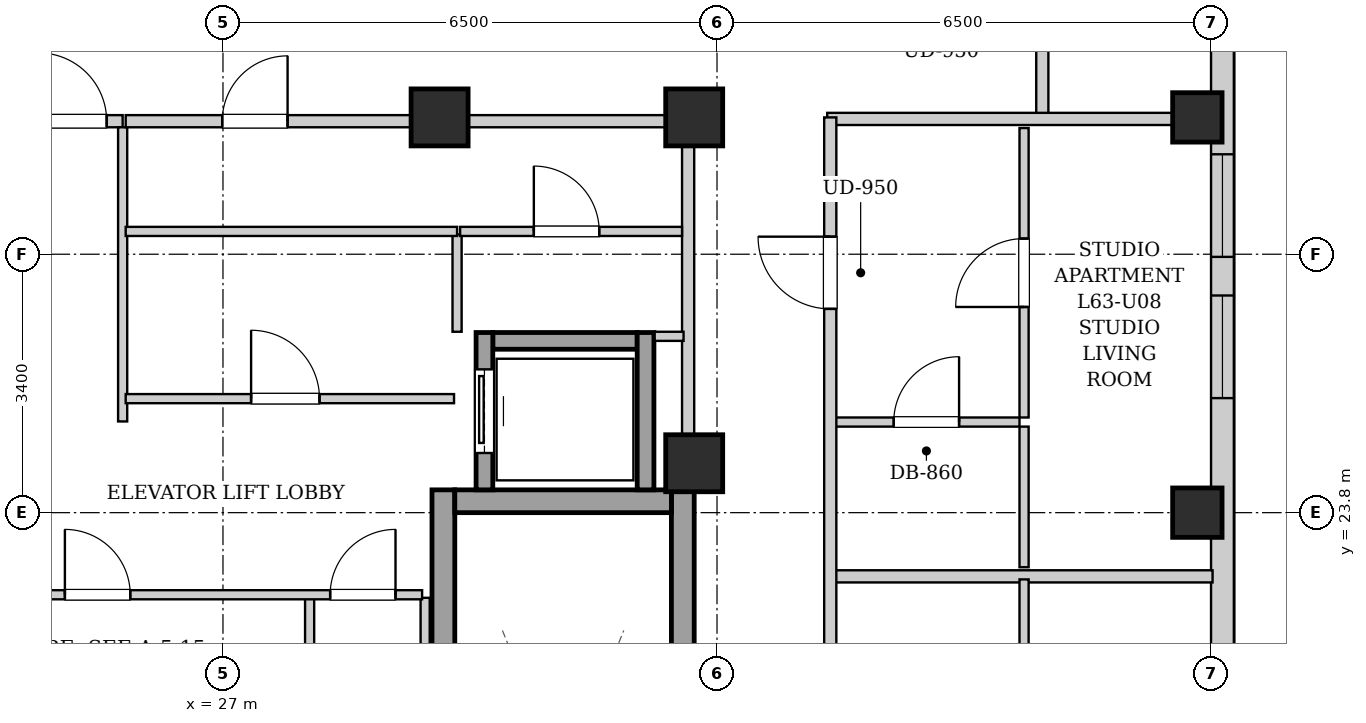
"""IFC4 building model, lengths in metres.
Left out: names, types, materials, properties, quantities, classifications, styles, units other than length and angle.
Written with IfcOpenShell. Run it as: python <this file> out.ifc"""

import sys

from ifc_helpers import new_model, si_unit, direction, frame, frame_2d, origin, origin_2d, place, context, subcontext, project, spatial, rectangle, extrude, element, fill, save


model = new_model("IFC4")
c1 = context("Model", 3, precision=1e-05, world=origin(), true_north=direction((0.0, 1.0)))
c2 = subcontext(c1, "Body", "Model", "MODEL_VIEW")
j1 = project(units=[si_unit("LENGTHUNIT", "METRE"), si_unit("PLANEANGLEUNIT", "RADIAN")], contexts=[c1])
p1 = place(None, origin())
s1 = spatial("IfcSite", under=j1, at=p1, CompositionType="ELEMENT")
p2 = place(p1, origin())
s2 = spatial("IfcBuilding", under=s1, at=p2, CompositionType="ELEMENT")
p3 = place(p2, frame((0.0, 0.0, 217.3)))
s3 = spatial("IfcBuildingStorey", under=s2, at=p3, CompositionType="ELEMENT", Elevation=217.3)
for number, where, z_axis, x_axis in (
    (1, (39.82, 23.8, 0.0), (0.0, 0.0, 1.0), (1.0, 0.0, 0.0)),
    (2, (39.82, 29.0, 0.0), (0.0, 0.0, 1.0), (1.0, 0.0, 0.0)),
):
    element("IfcColumn", number, at=place(p3, frame(where, z_axis=z_axis, x_axis=x_axis)), inside=s3, PredefinedType="COLUMN", context=c2, shape_type="SweptSolid", body=[
        extrude(rectangle(XDim=0.65, YDim=0.65, at=origin_2d()), origin(), (0.0, 0.0, 1.0), 3.4),
    ])
for number, where, z_axis, x_axis in (
    (3, (29.85, 29.0, 0.0), (0.0, 0.0, 1.0), (1.0, 0.0, 0.0)),
    (4, (33.2, 29.0, 0.0), (0.0, 0.0, 1.0), (1.0, 0.0, 0.0)),
    (5, (33.2, 24.45, 0.0), (0.0, 0.0, 1.0), (1.0, 0.0, 0.0)),
):
    element("IfcColumn", number, at=place(p3, frame(where, z_axis=z_axis, x_axis=x_axis)), inside=s3, PredefinedType="COLUMN", context=c2, shape_type="SweptSolid", body=[
        extrude(rectangle(XDim=0.75, YDim=0.75, at=origin_2d()), origin(), (0.0, 0.0, 1.0), 3.4),
    ])
p4 = place(p3, frame((40.15, 37.7, 0.0), z_axis=(0.0, 0.0, 1.0), x_axis=(0.0, -1.0, 0.0)))
e6 = element("IfcWall", 6, at=p4, inside=s3, PredefinedType="SOLIDWALL", context=c2, shape_type="SweptSolid", body=[
    extrude(rectangle(XDim=31.4, YDim=0.3, at=frame_2d((15.7, 0.0))), origin(), (0.0, 0.0, 1.0), 3.14),
])
p5 = place(p4, frame((28.546, 0.0, 0.55)))
e7 = element("IfcOpeningElement", 7, at=p5, cuts=e6, PredefinedType="OPENING", context=c2, shape_type="SweptSolid", body=[
    extrude(rectangle(XDim=1.35, YDim=1.2, at=frame_2d((0.675, 0.6))), frame((0.0, 0.16, 0.0), z_axis=(0.0, -1.0, 0.0), x_axis=(1.0, 0.0, 0.0)), (0.0, 0.0, 1.0), 0.32),
])
p6 = place(p4, frame((1.504, 0.0, 0.55)))
e8 = element("IfcOpeningElement", 8, at=p6, cuts=e6, PredefinedType="OPENING", context=c2, shape_type="SweptSolid", body=[
    extrude(rectangle(XDim=1.35, YDim=1.2, at=frame_2d((0.675, 0.6))), frame((0.0, 0.16, 0.0), z_axis=(0.0, -1.0, 0.0), x_axis=(1.0, 0.0, 0.0)), (0.0, 0.0, 1.0), 0.32),
])
p7 = place(p4, frame((18.2, 0.0, 0.55)))
e9 = element("IfcOpeningElement", 9, at=p7, cuts=e6, PredefinedType="OPENING", context=c2, shape_type="SweptSolid", body=[
    extrude(rectangle(XDim=1.35, YDim=1.2, at=frame_2d((0.675, 0.6))), frame((0.0, 0.16, 0.0), z_axis=(0.0, -1.0, 0.0), x_axis=(1.0, 0.0, 0.0)), (0.0, 0.0, 1.0), 0.32),
])
p8 = place(p4, frame((19.81, 0.0, 0.55)))
e10 = element("IfcOpeningElement", 10, at=p8, cuts=e6, PredefinedType="OPENING", context=c2, shape_type="SweptSolid", body=[
    extrude(rectangle(XDim=1.35, YDim=1.2, at=frame_2d((0.675, 0.6))), frame((0.0, 0.16, 0.0), z_axis=(0.0, -1.0, 0.0), x_axis=(1.0, 0.0, 0.0)), (0.0, 0.0, 1.0), 0.32),
])
p9 = place(p4, frame((11.043, 0.0, 0.55)))
e11 = element("IfcOpeningElement", 11, at=p9, cuts=e6, PredefinedType="OPENING", context=c2, shape_type="SweptSolid", body=[
    extrude(rectangle(XDim=1.35, YDim=1.2, at=frame_2d((0.675, 0.6))), frame((0.0, 0.16, 0.0), z_axis=(0.0, -1.0, 0.0), x_axis=(1.0, 0.0, 0.0)), (0.0, 0.0, 1.0), 0.32),
])
p10 = place(p4, frame((9.185, 0.0, 0.55)))
e12 = element("IfcOpeningElement", 12, at=p10, cuts=e6, PredefinedType="OPENING", context=c2, shape_type="SweptSolid", body=[
    extrude(rectangle(XDim=1.35, YDim=1.2, at=frame_2d((0.675, 0.6))), frame((0.0, 0.16, 0.0), z_axis=(0.0, -1.0, 0.0), x_axis=(1.0, 0.0, 0.0)), (0.0, 0.0, 1.0), 0.32),
])
for number, where, z_axis, x_axis in (
    (13, (29.9, 15.1, 0.0), (0.0, 0.0, 1.0), (0.0, 1.0, 0.0)),
    (14, (33.05, 15.1, 0.0), (0.0, 0.0, 1.0), (0.0, 1.0, 0.0)),
):
    element("IfcWall", number, at=place(p3, frame(where, z_axis=z_axis, x_axis=x_axis)), inside=s3, PredefinedType="SHEAR", context=c2, shape_type="SweptSolid", body=[
        extrude(rectangle(XDim=9.0, YDim=0.3, at=frame_2d((4.5, 0.0))), origin(), (0.0, 0.0, 1.0), 3.14),
    ])
p11 = place(p3, frame((30.05, 23.95, 0.0), z_axis=(0.0, 0.0, 1.0), x_axis=(1.0, 0.0, 0.0)))
e15 = element("IfcWall", 15, at=p11, inside=s3, PredefinedType="SHEAR", context=c2, shape_type="SweptSolid", body=[
    extrude(rectangle(XDim=2.85, YDim=0.3, at=frame_2d((1.425, 0.0))), origin(), (0.0, 0.0, 1.0), 3.14),
])
p12 = place(p3, frame((30.55, 26.06, 0.0), z_axis=(0.0, 0.0, 1.0), x_axis=(1.0, 0.0, 0.0)))
e16 = element("IfcWall", 16, at=p12, inside=s3, PredefinedType="SHEAR", context=c2, shape_type="SweptSolid", body=[
    extrude(rectangle(XDim=1.9, YDim=0.22, at=frame_2d((0.95, 0.0))), origin(), (0.0, 0.0, 1.0), 3.14),
])
p13 = place(p3, frame((30.44, 24.1, 0.0), z_axis=(0.0, 0.0, 1.0), x_axis=(0.0, 1.0, 0.0)))
e17 = element("IfcWall", 17, at=p13, inside=s3, PredefinedType="SHEAR", context=c2, shape_type="SweptSolid", body=[
    extrude(rectangle(XDim=2.07, YDim=0.22, at=frame_2d((1.035, 0.0))), origin(), (0.0, 0.0, 1.0), 3.14),
])
p14 = place(p13, frame((0.485, 0.0, 0.0)))
e18 = element("IfcOpeningElement", 18, at=p14, cuts=e17, PredefinedType="OPENING", context=c2, shape_type="SweptSolid", body=[
    extrude(rectangle(XDim=1.1, YDim=2.15, at=frame_2d((0.55, 1.075))), frame((0.0, 0.12, 0.0), z_axis=(0.0, -1.0, 0.0), x_axis=(1.0, 0.0, 0.0)), (0.0, 0.0, 1.0), 0.24),
])
p15 = place(p3, frame((32.56, 24.1, 0.0), z_axis=(0.0, 0.0, 1.0), x_axis=(0.0, 1.0, 0.0)))
e19 = element("IfcWall", 19, at=p15, inside=s3, PredefinedType="SHEAR", context=c2, shape_type="SweptSolid", body=[
    extrude(rectangle(XDim=2.07, YDim=0.22, at=frame_2d((1.035, 0.0))), origin(), (0.0, 0.0, 1.0), 3.14),
])
p16 = place(p3, frame((33.12, 24.12, 0.0), z_axis=(0.0, 0.0, 1.0), x_axis=(0.0, 1.0, 0.0)))
e20 = element("IfcWall", 20, at=p16, inside=s3, PredefinedType="PARTITIONING", context=c2, shape_type="SweptSolid", body=[
    extrude(rectangle(XDim=4.76, YDim=0.16, at=frame_2d((2.38, 0.0))), origin(), (0.0, 0.0, 1.0), 2.475),
])
p17 = place(p3, frame((24.36, 28.95, 0.0), z_axis=(0.0, 0.0, 1.0), x_axis=(1.0, 0.0, 0.0)))
e21 = element("IfcWall", 21, at=p17, inside=s3, PredefinedType="PARTITIONING", context=c2, shape_type="SweptSolid", body=[
    extrude(rectangle(XDim=1.32, YDim=0.16, at=frame_2d((0.66, 0.0))), origin(), (0.0, 0.0, 1.0), 2.668),
])
p18 = place(p17, frame((0.21, 0.0, 0.0)))
e22 = element("IfcOpeningElement", 22, at=p18, cuts=e21, PredefinedType="OPENING", context=c2, shape_type="SweptSolid", body=[
    extrude(rectangle(XDim=0.9, YDim=2.05, at=frame_2d((0.45, 1.025))), frame((0.0, 0.09, 0.0), z_axis=(0.0, -1.0, 0.0), x_axis=(1.0, 0.0, 0.0)), (0.0, 0.0, 1.0), 0.18),
])
p19 = place(p3, frame((25.68, 25.0, 0.0), z_axis=(0.0, 0.0, 1.0), x_axis=(0.0, 1.0, 0.0)))
e23 = element("IfcWall", 23, at=p19, inside=s3, PredefinedType="PARTITIONING", context=c2, shape_type="SweptSolid", body=[
    extrude(rectangle(XDim=3.87, YDim=0.12, at=frame_2d((1.935, 0.0))), origin(), (0.0, 0.0, 1.0), 3.14),
])
p20 = place(p3, frame((30.08, 26.18, 0.0), z_axis=(0.0, 0.0, 1.0), x_axis=(0.0, 1.0, 0.0)))
e24 = element("IfcWall", 24, at=p20, inside=s3, PredefinedType="PARTITIONING", context=c2, shape_type="SweptSolid", body=[
    extrude(rectangle(XDim=1.28, YDim=0.12, at=frame_2d((0.64, 0.0))), origin(), (0.0, 0.0, 1.0), 3.14),
])
p21 = place(p3, frame((32.68, 26.12, 0.0), z_axis=(0.0, 0.0, 1.0), x_axis=(1.0, 0.0, 0.0)))
e25 = element("IfcWall", 25, at=p21, inside=s3, PredefinedType="PARTITIONING", context=c2, shape_type="SweptSolid", body=[
    extrude(rectangle(XDim=0.38, YDim=0.12, at=frame_2d((0.19, 0.0))), origin(), (0.0, 0.0, 1.0), 3.14),
])
p22 = place(p3, frame((30.12, 27.5, 0.0), z_axis=(0.0, 0.0, 1.0), x_axis=(1.0, 0.0, 0.0)))
e26 = element("IfcWall", 26, at=p22, inside=s3, PredefinedType="PARTITIONING", context=c2, shape_type="SweptSolid", body=[
    extrude(rectangle(XDim=2.92, YDim=0.12, at=frame_2d((1.46, 0.0))), origin(), (0.0, 0.0, 1.0), 3.14),
])
p23 = place(p22, frame((0.97, 0.0, 0.0)))
e27 = element("IfcOpeningElement", 27, at=p23, cuts=e26, PredefinedType="OPENING", context=c2, shape_type="SweptSolid", body=[
    extrude(rectangle(XDim=0.86, YDim=2.05, at=frame_2d((0.43, 1.025))), frame((0.0, 0.07, 0.0), z_axis=(0.0, -1.0, 0.0), x_axis=(1.0, 0.0, 0.0)), (0.0, 0.0, 1.0), 0.14),
])
p24 = place(p3, frame((25.72, 27.5, 0.0), z_axis=(0.0, 0.0, 1.0), x_axis=(1.0, 0.0, 0.0)))
e28 = element("IfcWall", 28, at=p24, inside=s3, PredefinedType="PARTITIONING", context=c2, shape_type="SweptSolid", body=[
    extrude(rectangle(XDim=4.36, YDim=0.12, at=frame_2d((2.18, 0.0))), origin(), (0.0, 0.0, 1.0), 3.14),
])
p25 = place(p3, frame((25.72, 25.3, 0.0), z_axis=(0.0, 0.0, 1.0), x_axis=(1.0, 0.0, 0.0)))
e29 = element("IfcWall", 29, at=p25, inside=s3, PredefinedType="PARTITIONING", context=c2, shape_type="SweptSolid", body=[
    extrude(rectangle(XDim=4.32, YDim=0.12, at=frame_2d((2.16, 0.0))), origin(), (0.0, 0.0, 1.0), 3.14),
])
p26 = place(p25, frame((1.65, 0.0, 0.0)))
e30 = element("IfcOpeningElement", 30, at=p26, cuts=e29, PredefinedType="OPENING", context=c2, shape_type="SweptSolid", body=[
    extrude(rectangle(XDim=0.9, YDim=2.05, at=frame_2d((0.45, 1.025))), frame((0.0, 0.07, 0.0), z_axis=(0.0, -1.0, 0.0), x_axis=(1.0, 0.0, 0.0)), (0.0, 0.0, 1.0), 0.14),
])
p27 = place(p3, frame((25.72, 28.95, 0.0), z_axis=(0.0, 0.0, 1.0), x_axis=(1.0, 0.0, 0.0)))
e31 = element("IfcWall", 31, at=p27, inside=s3, PredefinedType="PARTITIONING", context=c2, shape_type="SweptSolid", body=[
    extrude(rectangle(XDim=7.32, YDim=0.16, at=frame_2d((3.66, 0.0))), origin(), (0.0, 0.0, 1.0), 2.668),
])
p28 = place(p27, frame((1.27, 0.0, 0.0)))
e32 = element("IfcOpeningElement", 32, at=p28, cuts=e31, PredefinedType="OPENING", context=c2, shape_type="SweptSolid", body=[
    extrude(rectangle(XDim=0.86, YDim=2.05, at=frame_2d((0.43, 1.025))), frame((0.0, 0.09, 0.0), z_axis=(0.0, -1.0, 0.0), x_axis=(1.0, 0.0, 0.0)), (0.0, 0.0, 1.0), 0.18),
])
p29 = place(p3, frame((29.66, 20.62, 0.0), z_axis=(0.0, 0.0, 1.0), x_axis=(0.0, 1.0, 0.0)))
e33 = element("IfcWall", 33, at=p29, inside=s3, PredefinedType="PARTITIONING", context=c2, shape_type="SweptSolid", body=[
    extrude(rectangle(XDim=2.06, YDim=0.12, at=frame_2d((1.03, 0.0))), origin(), (0.0, 0.0, 1.0), 3.14),
])
p30 = place(p3, frame((28.14, 21.65, 0.0), z_axis=(0.0, 0.0, 1.0), x_axis=(0.0, 1.0, 0.0)))
e34 = element("IfcWall", 34, at=p30, inside=s3, PredefinedType="PARTITIONING", context=c2, shape_type="SweptSolid", body=[
    extrude(rectangle(XDim=1.03, YDim=0.12, at=frame_2d((0.515, 0.0))), origin(), (0.0, 0.0, 1.0), 3.14),
])
p31 = place(p3, frame((22.35, 22.72, 0.0), z_axis=(0.0, 0.0, 1.0), x_axis=(1.0, 0.0, 0.0)))
e35 = element("IfcWall", 35, at=p31, inside=s3, PredefinedType="PARTITIONING", context=c2, shape_type="SweptSolid", body=[
    extrude(rectangle(XDim=7.27, YDim=0.12, at=frame_2d((3.635, 0.0))), origin(), (0.0, 0.0, 1.0), 3.14),
])
p32 = place(p31, frame((2.57, 0.0, 0.0)))
e36 = element("IfcOpeningElement", 36, at=p32, cuts=e35, PredefinedType="OPENING", context=c2, shape_type="SweptSolid", body=[
    extrude(rectangle(XDim=0.86, YDim=2.05, at=frame_2d((0.43, 1.025))), frame((0.0, 0.07, 0.0), z_axis=(0.0, -1.0, 0.0), x_axis=(1.0, 0.0, 0.0)), (0.0, 0.0, 1.0), 0.14),
])
p33 = place(p31, frame((6.06, 0.0, 0.0)))
e37 = element("IfcOpeningElement", 37, at=p33, cuts=e35, PredefinedType="OPENING", context=c2, shape_type="SweptSolid", body=[
    extrude(rectangle(XDim=0.86, YDim=2.05, at=frame_2d((0.43, 1.025))), frame((0.0, 0.07, 0.0), z_axis=(0.0, -1.0, 0.0), x_axis=(1.0, 0.0, 0.0)), (0.0, 0.0, 1.0), 0.14),
])
p34 = place(p3, frame((37.78, 28.98, 0.0), z_axis=(0.0, 0.0, 1.0), x_axis=(0.0, 1.0, 0.0)))
e38 = element("IfcWall", 38, at=p34, inside=s3, PredefinedType="PARTITIONING", context=c2, shape_type="SweptSolid", body=[
    extrude(rectangle(XDim=1.58, YDim=0.16, at=frame_2d((0.79, 0.0))), origin(), (0.0, 0.0, 1.0), 3.14),
])
p35 = place(p3, frame((34.95, 28.98, 0.0), z_axis=(0.0, 0.0, 1.0), x_axis=(1.0, 0.0, 0.0)))
e39 = element("IfcWall", 39, at=p35, inside=s3, PredefinedType="PARTITIONING", context=c2, shape_type="SweptSolid", body=[
    extrude(rectangle(XDim=5.07, YDim=0.16, at=frame_2d((2.535, 0.0))), origin(), (0.0, 0.0, 1.0), 2.668),
])
p36 = place(p3, frame((35.03, 22.962, 0.0), z_axis=(0.0, 0.0, 1.0), x_axis=(1.0, 0.0, 0.0)))
e40 = element("IfcWall", 40, at=p36, inside=s3, PredefinedType="PARTITIONING", context=c2, shape_type="SweptSolid", body=[
    extrude(rectangle(XDim=4.99, YDim=0.16, at=frame_2d((2.495, 0.0))), origin(), (0.0, 0.0, 1.0), 3.14),
])
p37 = place(p3, frame((37.54, 17.489, 0.0), z_axis=(0.0, 0.0, 1.0), x_axis=(0.0, 1.0, 0.0)))
e41 = element("IfcWall", 41, at=p37, inside=s3, PredefinedType="PARTITIONING", context=c2, shape_type="SweptSolid", body=[
    extrude(rectangle(XDim=5.433, YDim=0.12, at=frame_2d((2.717, 0.0))), origin(), (0.0, 0.0, 1.0), 3.14),
])
p38 = place(p37, frame((2.266, 0.0, 0.0)))
e42 = element("IfcOpeningElement", 42, at=p38, cuts=e41, PredefinedType="OPENING", context=c2, shape_type="SweptSolid", body=[
    extrude(rectangle(XDim=0.9, YDim=2.05, at=frame_2d((0.45, 1.025))), frame((0.0, 0.07, 0.0), z_axis=(0.0, -1.0, 0.0), x_axis=(1.0, 0.0, 0.0)), (0.0, 0.0, 1.0), 0.14),
])
p39 = place(p3, frame((35.03, 24.992, 0.0), z_axis=(0.0, 0.0, 1.0), x_axis=(1.0, 0.0, 0.0)))
e43 = element("IfcWall", 43, at=p39, inside=s3, PredefinedType="PARTITIONING", context=c2, shape_type="SweptSolid", body=[
    extrude(rectangle(XDim=2.45, YDim=0.12, at=frame_2d((1.225, 0.0))), origin(), (0.0, 0.0, 1.0), 3.14),
])
p40 = place(p39, frame((0.795, 0.0, 0.0)))
e44 = element("IfcOpeningElement", 44, at=p40, cuts=e43, PredefinedType="OPENING", context=c2, shape_type="SweptSolid", body=[
    extrude(rectangle(XDim=0.86, YDim=2.05, at=frame_2d((0.43, 1.025))), frame((0.0, 0.07, 0.0), z_axis=(0.0, -1.0, 0.0), x_axis=(1.0, 0.0, 0.0)), (0.0, 0.0, 1.0), 0.14),
])
p41 = place(p3, frame((37.54, 23.082, 0.0), z_axis=(0.0, 0.0, 1.0), x_axis=(0.0, 1.0, 0.0)))
e45 = element("IfcWall", 45, at=p41, inside=s3, PredefinedType="PARTITIONING", context=c2, shape_type="SweptSolid", body=[
    extrude(rectangle(XDim=1.85, YDim=0.12, at=frame_2d((0.925, 0.0))), origin(), (0.0, 0.0, 1.0), 3.14),
])
p42 = place(p3, frame((37.54, 25.052, 0.0), z_axis=(0.0, 0.0, 1.0), x_axis=(0.0, 1.0, 0.0)))
e46 = element("IfcWall", 46, at=p42, inside=s3, PredefinedType="PARTITIONING", context=c2, shape_type="SweptSolid", body=[
    extrude(rectangle(XDim=3.808, YDim=0.12, at=frame_2d((1.904, 0.0))), origin(), (0.0, 0.0, 1.0), 3.14),
])
p43 = place(p42, frame((1.454, 0.0, 0.0)))
e47 = element("IfcOpeningElement", 47, at=p43, cuts=e46, PredefinedType="OPENING", context=c2, shape_type="SweptSolid", body=[
    extrude(rectangle(XDim=0.9, YDim=2.05, at=frame_2d((0.45, 1.025))), frame((0.0, 0.07, 0.0), z_axis=(0.0, -1.0, 0.0), x_axis=(1.0, 0.0, 0.0)), (0.0, 0.0, 1.0), 0.14),
])
p44 = place(p3, frame((34.99, 15.07, 0.0), z_axis=(0.0, 0.0, 1.0), x_axis=(0.0, 1.0, 0.0)))
e48 = element("IfcWall", 48, at=p44, inside=s3, PredefinedType="PARTITIONING", context=c2, shape_type="SweptSolid", body=[
    extrude(rectangle(XDim=13.93, YDim=0.16, at=frame_2d((6.965, 0.0))), origin(), (0.0, 0.0, 1.0), 3.14),
])
p45 = place(p44, frame((4.661, 0.0, 0.0)))
e49 = element("IfcOpeningElement", 49, at=p45, cuts=e48, PredefinedType="OPENING", context=c2, shape_type="SweptSolid", body=[
    extrude(rectangle(XDim=0.95, YDim=2.1, at=frame_2d((0.475, 1.05))), frame((0.0, 0.09, 0.0), z_axis=(0.0, -1.0, 0.0), x_axis=(1.0, 0.0, 0.0)), (0.0, 0.0, 1.0), 0.18),
])
p46 = place(p44, frame((11.411, 0.0, 0.0)))
e50 = element("IfcOpeningElement", 50, at=p46, cuts=e48, PredefinedType="OPENING", context=c2, shape_type="SweptSolid", body=[
    extrude(rectangle(XDim=0.95, YDim=2.1, at=frame_2d((0.475, 1.05))), frame((0.0, 0.09, 0.0), z_axis=(0.0, -1.0, 0.0), x_axis=(1.0, 0.0, 0.0)), (0.0, 0.0, 1.0), 0.18),
])
p47 = place(p14, origin())
e51 = element("IfcDoor", 51, at=p47, inside=s3, OperationType="SLIDING_TO_LEFT", PredefinedType="DOOR", context=c2, shape_type="SweptSolid", body=[
    extrude(rectangle(XDim=1.1, YDim=2.15, at=frame_2d((0.55, 1.075))), frame((0.0, 0.025, 0.0), z_axis=(0.0, -1.0, 0.0), x_axis=(1.0, 0.0, 0.0)), (0.0, 0.0, 1.0), 0.05),
])
fill(e18, e51)
p48 = place(p18, origin())
e52 = element("IfcDoor", 52, at=p48, inside=s3, OperationType="SINGLE_SWING_LEFT", PredefinedType="DOOR", context=c2, shape_type="SweptSolid", body=[
    extrude(rectangle(XDim=0.9, YDim=2.05, at=frame_2d((0.45, 1.025))), frame((0.0, 0.025, 0.0), z_axis=(0.0, -1.0, 0.0), x_axis=(1.0, 0.0, 0.0)), (0.0, 0.0, 1.0), 0.05),
])
fill(e22, e52)
p49 = place(p23, origin())
e53 = element("IfcDoor", 53, at=p49, inside=s3, OperationType="SINGLE_SWING_LEFT", PredefinedType="DOOR", context=c2, shape_type="SweptSolid", body=[
    extrude(rectangle(XDim=0.86, YDim=2.05, at=frame_2d((0.43, 1.025))), frame((0.0, 0.025, 0.0), z_axis=(0.0, -1.0, 0.0), x_axis=(1.0, 0.0, 0.0)), (0.0, 0.0, 1.0), 0.05),
])
fill(e27, e53)
p50 = place(p26, origin())
e54 = element("IfcDoor", 54, at=p50, inside=s3, OperationType="SINGLE_SWING_LEFT", PredefinedType="DOOR", context=c2, shape_type="SweptSolid", body=[
    extrude(rectangle(XDim=0.9, YDim=2.05, at=frame_2d((0.45, 1.025))), frame((0.0, 0.025, 0.0), z_axis=(0.0, -1.0, 0.0), x_axis=(1.0, 0.0, 0.0)), (0.0, 0.0, 1.0), 0.05),
])
fill(e30, e54)
p51 = place(p28, origin())
e55 = element("IfcDoor", 55, at=p51, inside=s3, OperationType="SINGLE_SWING_RIGHT", PredefinedType="DOOR", context=c2, shape_type="SweptSolid", body=[
    extrude(rectangle(XDim=0.86, YDim=2.05, at=frame_2d((0.43, 1.025))), frame((0.0, 0.025, 0.0), z_axis=(0.0, -1.0, 0.0), x_axis=(1.0, 0.0, 0.0)), (0.0, 0.0, 1.0), 0.05),
])
fill(e32, e55)
p52 = place(p32, origin())
e56 = element("IfcDoor", 56, at=p52, inside=s3, OperationType="SINGLE_SWING_LEFT", PredefinedType="DOOR", context=c2, shape_type="SweptSolid", body=[
    extrude(rectangle(XDim=0.86, YDim=2.05, at=frame_2d((0.43, 1.025))), frame((0.0, 0.025, 0.0), z_axis=(0.0, -1.0, 0.0), x_axis=(1.0, 0.0, 0.0)), (0.0, 0.0, 1.0), 0.05),
])
fill(e36, e56)
p53 = place(p33, origin())
e57 = element("IfcDoor", 57, at=p53, inside=s3, OperationType="SINGLE_SWING_RIGHT", PredefinedType="DOOR", context=c2, shape_type="SweptSolid", body=[
    extrude(rectangle(XDim=0.86, YDim=2.05, at=frame_2d((0.43, 1.025))), frame((0.0, 0.025, 0.0), z_axis=(0.0, -1.0, 0.0), x_axis=(1.0, 0.0, 0.0)), (0.0, 0.0, 1.0), 0.05),
])
fill(e37, e57)
p54 = place(p40, origin())
e58 = element("IfcDoor", 58, at=p54, inside=s3, OperationType="SINGLE_SWING_RIGHT", PredefinedType="DOOR", context=c2, shape_type="SweptSolid", body=[
    extrude(rectangle(XDim=0.86, YDim=2.05, at=frame_2d((0.43, 1.025))), frame((0.0, 0.025, 0.0), z_axis=(0.0, -1.0, 0.0), x_axis=(1.0, 0.0, 0.0)), (0.0, 0.0, 1.0), 0.05),
])
fill(e44, e58)
p55 = place(p43, origin())
e59 = element("IfcDoor", 59, at=p55, inside=s3, OperationType="SINGLE_SWING_LEFT", PredefinedType="DOOR", context=c2, shape_type="SweptSolid", body=[
    extrude(rectangle(XDim=0.9, YDim=2.05, at=frame_2d((0.45, 1.025))), frame((0.0, 0.025, 0.0), z_axis=(0.0, -1.0, 0.0), x_axis=(1.0, 0.0, 0.0)), (0.0, 0.0, 1.0), 0.05),
])
fill(e47, e59)
p56 = place(p46, origin())
e60 = element("IfcDoor", 60, at=p56, inside=s3, OperationType="SINGLE_SWING_RIGHT", PredefinedType="DOOR", context=c2, shape_type="SweptSolid", body=[
    extrude(rectangle(XDim=0.95, YDim=2.1, at=frame_2d((0.475, 1.05))), frame((0.0, 0.025, 0.0), z_axis=(0.0, -1.0, 0.0), x_axis=(1.0, 0.0, 0.0)), (0.0, 0.0, 1.0), 0.05),
])
fill(e50, e60)
p57 = place(p9, origin())
e61 = element("IfcWindow", 61, at=p57, inside=s3, PartitioningType="SINGLE_PANEL", PredefinedType="WINDOW", context=c2, shape_type="SweptSolid", body=[
    extrude(rectangle(XDim=1.35, YDim=1.2, at=frame_2d((0.675, 0.6))), frame((0.0, 0.03, 0.0), z_axis=(0.0, -1.0, 0.0), x_axis=(1.0, 0.0, 0.0)), (0.0, 0.0, 1.0), 0.06),
])
fill(e11, e61)
p58 = place(p10, origin())
e62 = element("IfcWindow", 62, at=p58, inside=s3, PartitioningType="SINGLE_PANEL", PredefinedType="WINDOW", context=c2, shape_type="SweptSolid", body=[
    extrude(rectangle(XDim=1.35, YDim=1.2, at=frame_2d((0.675, 0.6))), frame((0.0, 0.03, 0.0), z_axis=(0.0, -1.0, 0.0), x_axis=(1.0, 0.0, 0.0)), (0.0, 0.0, 1.0), 0.06),
])
fill(e12, e62)
save(model, sys.argv[1])
